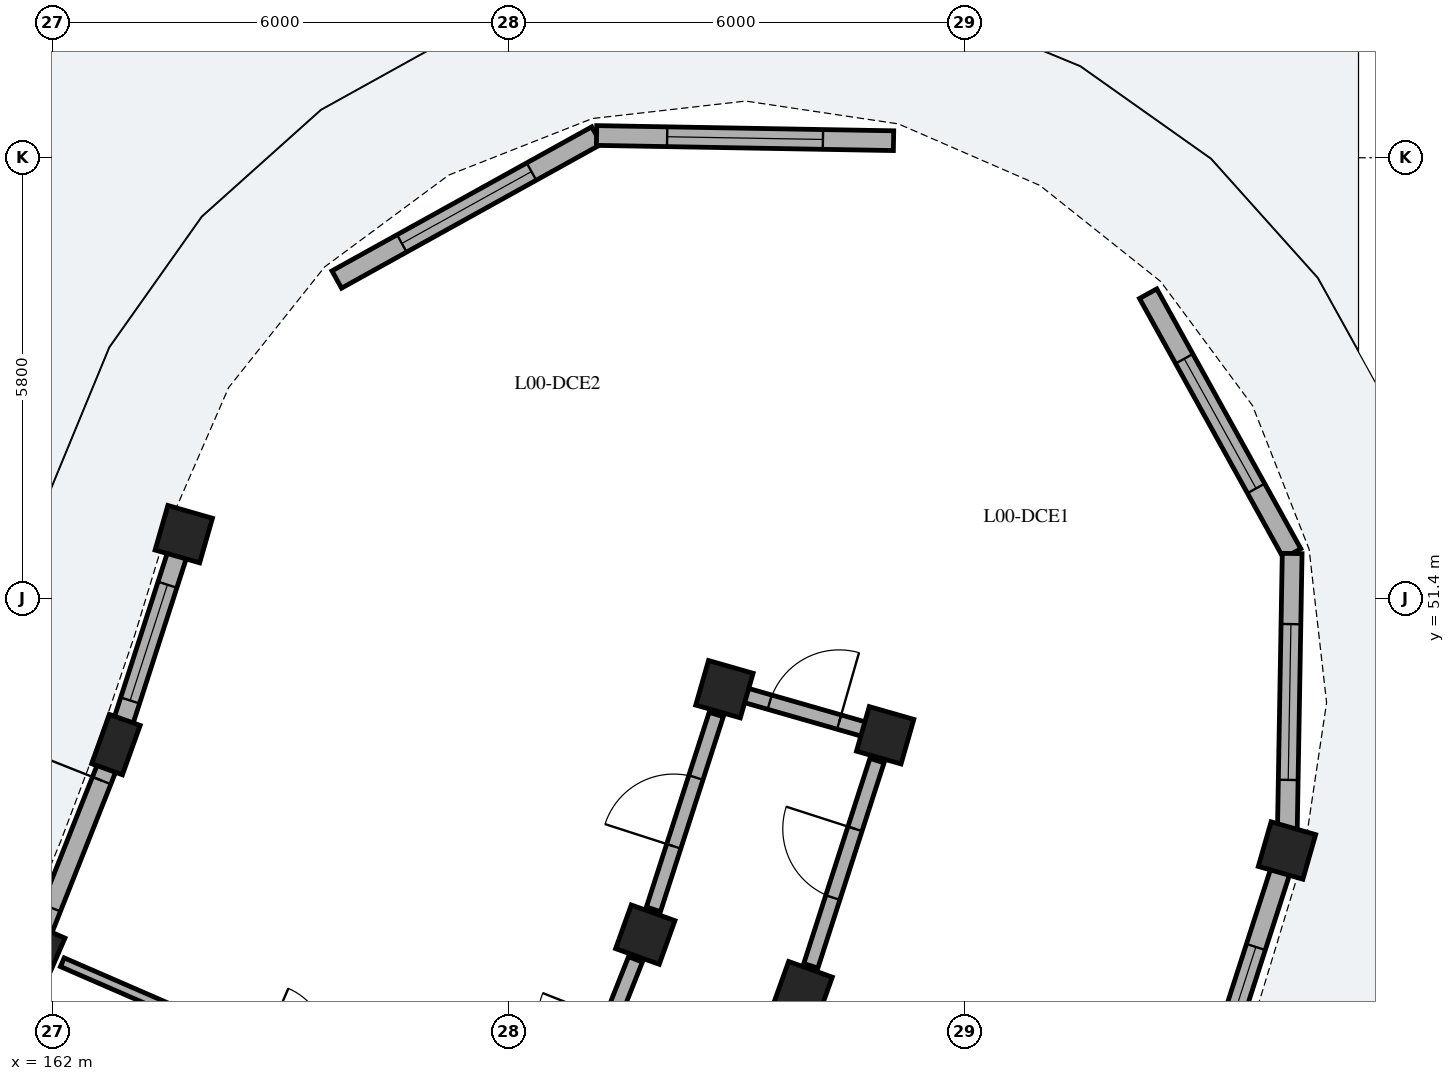
"""IFC4 building model, lengths in metres.
Left out: names, types, materials, properties, quantities, classifications, styles, units other than length and angle.
Written with IfcOpenShell. Run it as: python <this file> out.ifc"""

import sys

from ifc_helpers import new_model, si_unit, direction, frame, frame_2d, origin, origin_2d, place, context, subcontext, project, spatial, rectangle, extrude, element, fill, save


model = new_model("IFC4")
c1 = context("Model", 3, precision=1e-05, world=origin(), true_north=direction((0.0, 1.0)))
c2 = subcontext(c1, "Body", "Model", "MODEL_VIEW")
j1 = project(units=[si_unit("LENGTHUNIT", "METRE"), si_unit("PLANEANGLEUNIT", "RADIAN")], contexts=[c1])
p1 = place(None, origin())
s1 = spatial("IfcSite", under=j1, at=p1, CompositionType="ELEMENT")
p2 = place(p1, origin())
s2 = spatial("IfcBuilding", under=s1, at=p2, CompositionType="ELEMENT")
p3 = place(p2, origin())
s3 = spatial("IfcBuildingStorey", under=s2, at=p3, CompositionType="ELEMENT", Elevation=0.0)
p4 = place(p3, frame((161.763, 46.776, 0.0), z_axis=(0.0, 0.0, 1.0), x_axis=(0.917060074385, -0.398749068925, 0.0)))
e1 = element("IfcColumn", 1, at=p4, inside=s3, PredefinedType="COLUMN", context=c2, shape_type="SweptSolid", body=[
    extrude(rectangle(XDim=0.61, YDim=0.61, at=origin_2d()), origin(), (0.0, 0.0, 1.0), 4.485),
])
p5 = place(p3, frame((162.835, 49.479, 0.0), z_axis=(0.0, 0.0, 1.0), x_axis=(0.941176015256, -0.337916718003, 0.0)))
e2 = element("IfcColumn", 2, at=p5, inside=s3, PredefinedType="PILASTER", context=c2, shape_type="SweptSolid", body=[
    extrude(rectangle(XDim=0.43, YDim=0.69, at=origin_2d()), origin(), (0.0, 0.0, 1.0), 4.485),
])
for number, where, z_axis, x_axis in (
    (3, (169.8, 46.979, 0.0), (0.0, 0.0, 1.0), (0.941, -0.338, 0.0)),
    (4, (171.871, 46.236, 0.0), (0.0, 0.0, 1.0), (0.941, -0.338, 0.0)),
    (5, (163.728, 52.248, 0.0), (0.0, 0.0, 1.0), (0.961, -0.276, 0.0)),
    (6, (170.841, 50.208, 0.0), (0.0, 0.0, 1.0), (0.961, -0.276, 0.0)),
    (7, (172.956, 49.602, 0.0), (0.0, 0.0, 1.0), (0.961, -0.276, 0.0)),
    (8, (178.243, 48.086, 0.0), (0.0, 0.0, 1.0), (0.961, -0.276, 0.0)),
):
    element("IfcColumn", number, at=place(p3, frame(where, z_axis=z_axis, x_axis=x_axis)), inside=s3, PredefinedType="COLUMN", context=c2, shape_type="SweptSolid", body=[
        extrude(rectangle(XDim=0.61, YDim=0.61, at=origin_2d()), origin(), (0.0, 0.0, 1.0), 4.485),
    ])
p6 = place(p3, frame((161.865, 47.031, 0.0), z_axis=(0.0, 0.0, 1.0), x_axis=(0.368500941406, 0.92962737491, 0.0)))
e9 = element("IfcWall", 9, at=p6, inside=s3, PredefinedType="SOLIDWALL", context=c2, shape_type="SweptSolid", body=[
    extrude(rectangle(XDim=2.449, YDim=0.26, at=frame_2d((1.224, 0.0))), origin(), (0.0, 0.0, 1.0), 3.755),
])
p7 = place(p6, frame((0.324, 0.0, 0.0)))
e10 = element("IfcOpeningElement", 10, at=p7, cuts=e9, PredefinedType="OPENING", context=c2, shape_type="SweptSolid", body=[
    extrude(rectangle(XDim=1.8, YDim=2.15, at=frame_2d((0.9, 1.075))), frame((0.0, 0.14, 0.0), z_axis=(0.0, -1.0, 0.0), x_axis=(1.0, 0.0, 0.0)), (0.0, 0.0, 1.0), 0.28),
])
p8 = place(p3, frame((177.104, 44.553, 0.0), z_axis=(0.0, 0.0, 1.0), x_axis=(0.306963342814, 0.951721338506, 0.0)))
e11 = element("IfcWall", 11, at=p8, inside=s3, PredefinedType="SOLIDWALL", context=c2, shape_type="SweptSolid", body=[
    extrude(rectangle(XDim=3.437, YDim=0.26, at=frame_2d((1.718, 0.0))), origin(), (0.0, 0.0, 1.0), 3.755),
])
p9 = place(p8, frame((1.058, 0.0, 0.55)))
e12 = element("IfcOpeningElement", 12, at=p9, cuts=e11, PredefinedType="OPENING", context=c2, shape_type="SweptSolid", body=[
    extrude(rectangle(XDim=1.32, YDim=1.585, at=frame_2d((0.66, 0.792))), frame((0.0, 0.14, 0.0), z_axis=(0.0, -1.0, 0.0), x_axis=(1.0, 0.0, 0.0)), (0.0, 0.0, 1.0), 0.28),
])
p10 = place(p3, frame((162.892, 49.656, 0.0), z_axis=(0.0, 0.0, 1.0), x_axis=(0.306909552229, 0.951738686169, 0.0)))
e13 = element("IfcWall", 13, at=p10, inside=s3, PredefinedType="SOLIDWALL", context=c2, shape_type="SweptSolid", body=[
    extrude(rectangle(XDim=2.448, YDim=0.26, at=frame_2d((1.224, 0.0))), origin(), (0.0, 0.0, 1.0), 3.755),
])
p11 = place(p10, frame((0.424, 0.0, 0.55)))
e14 = element("IfcOpeningElement", 14, at=p11, cuts=e13, PredefinedType="OPENING", context=c2, shape_type="SweptSolid", body=[
    extrude(rectangle(XDim=1.6, YDim=1.535, at=frame_2d((0.8, 0.768))), frame((0.0, 0.14, 0.0), z_axis=(0.0, -1.0, 0.0), x_axis=(1.0, 0.0, 0.0)), (0.0, 0.0, 1.0), 0.28),
])
p12 = place(p3, frame((165.741, 55.598, 0.0), z_axis=(0.0, 0.0, 1.0), x_axis=(0.874616555828, 0.48481530532, 0.0)))
e15 = element("IfcWall", 15, at=p12, inside=s3, PredefinedType="SOLIDWALL", context=c2, shape_type="SweptSolid", body=[
    extrude(rectangle(XDim=3.908, YDim=0.26, at=frame_2d((1.954, 0.0))), origin(), (0.0, 0.0, 1.0), 3.755),
])
p13 = place(p12, frame((0.979, 0.0, 0.4)))
e16 = element("IfcOpeningElement", 16, at=p13, cuts=e15, PredefinedType="OPENING", context=c2, shape_type="SweptSolid", body=[
    extrude(rectangle(XDim=1.95, YDim=1.78, at=frame_2d((0.975, 0.89))), frame((0.0, 0.14, 0.0), z_axis=(0.0, -1.0, 0.0), x_axis=(1.0, 0.0, 0.0)), (0.0, 0.0, 1.0), 0.28),
])
p14 = place(p3, frame((169.159, 57.493, 0.0), z_axis=(0.0, 0.0, 1.0), x_axis=(0.999847005776, -0.017491856396, 0.0)))
e17 = element("IfcWall", 17, at=p14, inside=s3, PredefinedType="SOLIDWALL", context=c2, shape_type="SweptSolid", body=[
    extrude(rectangle(XDim=3.908, YDim=0.26, at=frame_2d((1.954, 0.0))), origin(), (0.0, 0.0, 1.0), 3.755),
])
p15 = place(p14, frame((0.929, 0.0, 0.4)))
e18 = element("IfcOpeningElement", 18, at=p15, cuts=e17, PredefinedType="OPENING", context=c2, shape_type="SweptSolid", body=[
    extrude(rectangle(XDim=2.05, YDim=1.82, at=frame_2d((1.025, 0.91))), frame((0.0, 0.14, 0.0), z_axis=(0.0, -1.0, 0.0), x_axis=(1.0, 0.0, 0.0)), (0.0, 0.0, 1.0), 0.28),
])
p16 = place(p3, frame((176.417, 55.412, 0.0), z_axis=(0.0, 0.0, 1.0), x_axis=(0.48481530532, -0.874616555828, 0.0)))
e19 = element("IfcWall", 19, at=p16, inside=s3, PredefinedType="SOLIDWALL", context=c2, shape_type="SweptSolid", body=[
    extrude(rectangle(XDim=3.908, YDim=0.26, at=frame_2d((1.954, 0.0))), origin(), (0.0, 0.0, 1.0), 3.755),
])
p17 = place(p16, frame((0.979, 0.0, 0.4)))
e20 = element("IfcOpeningElement", 20, at=p17, cuts=e19, PredefinedType="OPENING", context=c2, shape_type="SweptSolid", body=[
    extrude(rectangle(XDim=1.95, YDim=1.78, at=frame_2d((0.975, 0.89))), frame((0.0, 0.14, 0.0), z_axis=(0.0, -1.0, 0.0), x_axis=(1.0, 0.0, 0.0)), (0.0, 0.0, 1.0), 0.28),
])
p18 = place(p3, frame((178.311, 51.993, 0.0), z_axis=(0.0, 0.0, 1.0), x_axis=(-0.017428315893, -0.999848115368, 0.0)))
e21 = element("IfcWall", 21, at=p18, inside=s3, PredefinedType="SOLIDWALL", context=c2, shape_type="SweptSolid", body=[
    extrude(rectangle(XDim=3.908, YDim=0.26, at=frame_2d((1.954, 0.0))), origin(), (0.0, 0.0, 1.0), 3.755),
])
p19 = place(p18, frame((0.929, 0.0, 0.4)))
e22 = element("IfcOpeningElement", 22, at=p19, cuts=e21, PredefinedType="OPENING", context=c2, shape_type="SweptSolid", body=[
    extrude(rectangle(XDim=2.05, YDim=1.82, at=frame_2d((1.025, 0.91))), frame((0.0, 0.14, 0.0), z_axis=(0.0, -1.0, 0.0), x_axis=(1.0, 0.0, 0.0)), (0.0, 0.0, 1.0), 0.28),
])
p20 = place(p3, frame((162.13, 46.616, 0.0), z_axis=(0.0, 0.0, 1.0), x_axis=(0.9170582943, -0.398753162817, 0.0)))
e23 = element("IfcWall", 23, at=p20, inside=s3, PredefinedType="PARTITIONING", context=c2, shape_type="SweptSolid", body=[
    extrude(rectangle(XDim=6.6, YDim=0.125, at=frame_2d((3.3, 0.0))), origin(), (0.0, 0.0, 1.0), 3.1),
])
p21 = place(p20, frame((2.865, 0.0, 0.0)))
e24 = element("IfcOpeningElement", 24, at=p21, cuts=e23, PredefinedType="OPENING", context=c2, shape_type="SweptSolid", body=[
    extrude(rectangle(XDim=0.87, YDim=2.08, at=frame_2d((0.435, 1.04))), frame((0.0, 0.073, 0.0), z_axis=(0.0, -1.0, 0.0), x_axis=(1.0, 0.0, 0.0)), (0.0, 0.0, 1.0), 0.145),
])
p22 = place(p3, frame((168.678, 44.15, 0.0), z_axis=(0.0, 0.0, 1.0), x_axis=(0.368528468945, 0.929616462622, 0.0)))
e25 = element("IfcWall", 25, at=p22, inside=s3, PredefinedType="PARTITIONING", context=c2, shape_type="SweptSolid", body=[
    extrude(rectangle(XDim=2.693, YDim=0.195, at=frame_2d((1.346, 0.0))), origin(), (0.0, 0.0, 1.0), 3.1),
])
p23 = place(p22, frame((0.862, 0.0, 0.0)))
e26 = element("IfcOpeningElement", 26, at=p23, cuts=e25, PredefinedType="OPENING", context=c2, shape_type="SweptSolid", body=[
    extrude(rectangle(XDim=0.97, YDim=2.15, at=frame_2d((0.485, 1.075))), frame((0.0, 0.107, 0.0), z_axis=(0.0, -1.0, 0.0), x_axis=(1.0, 0.0, 0.0)), (0.0, 0.0, 1.0), 0.215),
])
p24 = place(p3, frame((171.978, 46.569, 0.0), z_axis=(0.0, 0.0, 1.0), x_axis=(0.30694495224, 0.951727269912, 0.0)))
e27 = element("IfcWall", 27, at=p24, inside=s3, PredefinedType="PARTITIONING", context=c2, shape_type="SweptSolid", body=[
    extrude(rectangle(XDim=2.837, YDim=0.195, at=frame_2d((1.418, 0.0))), origin(), (0.0, 0.0, 1.0), 3.1),
])
p25 = place(p24, frame((0.944, 0.0, 0.0)))
e28 = element("IfcOpeningElement", 28, at=p25, cuts=e27, PredefinedType="OPENING", context=c2, shape_type="SweptSolid", body=[
    extrude(rectangle(XDim=0.95, YDim=2.13, at=frame_2d((0.475, 1.065))), frame((0.0, 0.107, 0.0), z_axis=(0.0, -1.0, 0.0), x_axis=(1.0, 0.0, 0.0)), (0.0, 0.0, 1.0), 0.215),
])
p26 = place(p3, frame((169.907, 47.312, 0.0), z_axis=(0.0, 0.0, 1.0), x_axis=(0.306883578189, 0.951747061691, 0.0)))
e29 = element("IfcWall", 29, at=p26, inside=s3, PredefinedType="PARTITIONING", context=c2, shape_type="SweptSolid", body=[
    extrude(rectangle(XDim=2.693, YDim=0.195, at=frame_2d((1.346, 0.0))), origin(), (0.0, 0.0, 1.0), 3.1),
])
p27 = place(p26, frame((0.872, 0.0, 0.0)))
e30 = element("IfcOpeningElement", 30, at=p27, cuts=e29, PredefinedType="OPENING", context=c2, shape_type="SweptSolid", body=[
    extrude(rectangle(XDim=0.95, YDim=2.13, at=frame_2d((0.475, 1.065))), frame((0.0, 0.107, 0.0), z_axis=(0.0, -1.0, 0.0), x_axis=(1.0, 0.0, 0.0)), (0.0, 0.0, 1.0), 0.215),
])
p28 = place(p3, frame((170.889, 50.194, 0.0), z_axis=(0.0, 0.0, 1.0), x_axis=(0.961264701934, -0.275626872449, 0.0)))
e31 = element("IfcWall", 31, at=p28, inside=s3, PredefinedType="PARTITIONING", context=c2, shape_type="SweptSolid", body=[
    extrude(rectangle(XDim=2.1, YDim=0.195, at=frame_2d((1.05, 0.0))), origin(), (0.0, 0.0, 1.0), 3.1),
])
p29 = place(p28, frame((0.57, 0.0, 0.0)))
e32 = element("IfcOpeningElement", 32, at=p29, cuts=e31, PredefinedType="OPENING", context=c2, shape_type="SweptSolid", body=[
    extrude(rectangle(XDim=0.95, YDim=2.13, at=frame_2d((0.475, 1.065))), frame((0.0, 0.107, 0.0), z_axis=(0.0, -1.0, 0.0), x_axis=(1.0, 0.0, 0.0)), (0.0, 0.0, 1.0), 0.215),
])
p30 = place(p7, origin())
e33 = element("IfcDoor", 33, at=p30, inside=s3, OperationType="DOUBLE_DOOR_SINGLE_SWING", PredefinedType="DOOR", context=c2, shape_type="SweptSolid", body=[
    extrude(rectangle(XDim=1.8, YDim=2.15, at=frame_2d((0.9, 1.075))), frame((0.0, 0.025, 0.0), z_axis=(0.0, -1.0, 0.0), x_axis=(1.0, 0.0, 0.0)), (0.0, 0.0, 1.0), 0.05),
])
fill(e10, e33)
p31 = place(p9, origin())
e34 = element("IfcWindow", 34, at=p31, inside=s3, PartitioningType="SINGLE_PANEL", PredefinedType="WINDOW", context=c2, shape_type="SweptSolid", body=[
    extrude(rectangle(XDim=1.32, YDim=1.585, at=frame_2d((0.66, 0.792))), frame((0.0, 0.03, 0.0), z_axis=(0.0, -1.0, 0.0), x_axis=(1.0, 0.0, 0.0)), (0.0, 0.0, 1.0), 0.06),
])
fill(e12, e34)
p32 = place(p11, origin())
e35 = element("IfcWindow", 35, at=p32, inside=s3, PartitioningType="SINGLE_PANEL", PredefinedType="WINDOW", context=c2, shape_type="SweptSolid", body=[
    extrude(rectangle(XDim=1.6, YDim=1.535, at=frame_2d((0.8, 0.768))), frame((0.0, 0.03, 0.0), z_axis=(0.0, -1.0, 0.0), x_axis=(1.0, 0.0, 0.0)), (0.0, 0.0, 1.0), 0.06),
])
fill(e14, e35)
p33 = place(p13, origin())
e36 = element("IfcWindow", 36, at=p33, inside=s3, PartitioningType="SINGLE_PANEL", PredefinedType="WINDOW", context=c2, shape_type="SweptSolid", body=[
    extrude(rectangle(XDim=1.95, YDim=1.78, at=frame_2d((0.975, 0.89))), frame((0.0, 0.03, 0.0), z_axis=(0.0, -1.0, 0.0), x_axis=(1.0, 0.0, 0.0)), (0.0, 0.0, 1.0), 0.06),
])
fill(e16, e36)
p34 = place(p15, origin())
e37 = element("IfcWindow", 37, at=p34, inside=s3, PartitioningType="SINGLE_PANEL", PredefinedType="WINDOW", context=c2, shape_type="SweptSolid", body=[
    extrude(rectangle(XDim=2.05, YDim=1.82, at=frame_2d((1.025, 0.91))), frame((0.0, 0.03, 0.0), z_axis=(0.0, -1.0, 0.0), x_axis=(1.0, 0.0, 0.0)), (0.0, 0.0, 1.0), 0.06),
])
fill(e18, e37)
p35 = place(p17, origin())
e38 = element("IfcWindow", 38, at=p35, inside=s3, PartitioningType="SINGLE_PANEL", PredefinedType="WINDOW", context=c2, shape_type="SweptSolid", body=[
    extrude(rectangle(XDim=1.95, YDim=1.78, at=frame_2d((0.975, 0.89))), frame((0.0, 0.03, 0.0), z_axis=(0.0, -1.0, 0.0), x_axis=(1.0, 0.0, 0.0)), (0.0, 0.0, 1.0), 0.06),
])
fill(e20, e38)
p36 = place(p19, origin())
e39 = element("IfcWindow", 39, at=p36, inside=s3, PartitioningType="SINGLE_PANEL", PredefinedType="WINDOW", context=c2, shape_type="SweptSolid", body=[
    extrude(rectangle(XDim=2.05, YDim=1.82, at=frame_2d((1.025, 0.91))), frame((0.0, 0.03, 0.0), z_axis=(0.0, -1.0, 0.0), x_axis=(1.0, 0.0, 0.0)), (0.0, 0.0, 1.0), 0.06),
])
fill(e22, e39)
p37 = place(p25, origin())
e40 = element("IfcDoor", 40, at=p37, inside=s3, OperationType="SINGLE_SWING_RIGHT", PredefinedType="DOOR", context=c2, shape_type="SweptSolid", body=[
    extrude(rectangle(XDim=0.95, YDim=2.13, at=frame_2d((0.475, 1.065))), frame((0.0, 0.025, 0.0), z_axis=(0.0, -1.0, 0.0), x_axis=(1.0, 0.0, 0.0)), (0.0, 0.0, 1.0), 0.05),
])
fill(e28, e40)
p38 = place(p27, origin())
e41 = element("IfcDoor", 41, at=p38, inside=s3, OperationType="SINGLE_SWING_LEFT", PredefinedType="DOOR", context=c2, shape_type="SweptSolid", body=[
    extrude(rectangle(XDim=0.95, YDim=2.13, at=frame_2d((0.475, 1.065))), frame((0.0, 0.025, 0.0), z_axis=(0.0, -1.0, 0.0), x_axis=(1.0, 0.0, 0.0)), (0.0, 0.0, 1.0), 0.05),
])
fill(e30, e41)
p39 = place(p29, origin())
e42 = element("IfcDoor", 42, at=p39, inside=s3, OperationType="SINGLE_SWING_RIGHT", PredefinedType="DOOR", context=c2, shape_type="SweptSolid", body=[
    extrude(rectangle(XDim=0.95, YDim=2.13, at=frame_2d((0.475, 1.065))), frame((0.0, 0.025, 0.0), z_axis=(0.0, -1.0, 0.0), x_axis=(1.0, 0.0, 0.0)), (0.0, 0.0, 1.0), 0.05),
])
fill(e32, e42)
save(model, sys.argv[1])
